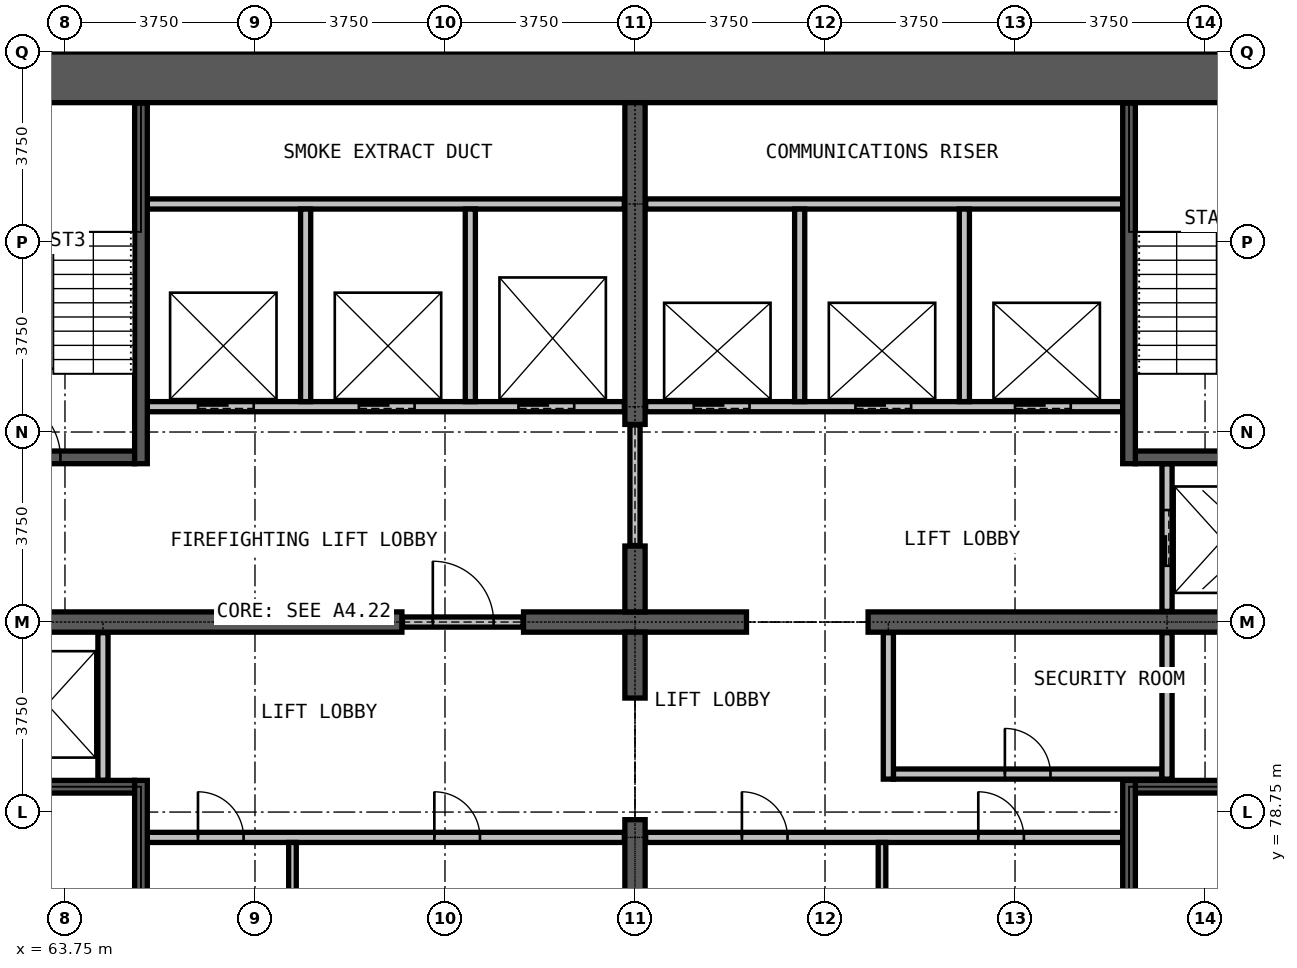
"""IFC4 building model, lengths in metres.
Left out: names, types, materials, properties, quantities, classifications, styles, units other than length and angle.
Written with IfcOpenShell. Run it as: python <this file> out.ifc"""

import sys

from ifc_helpers import new_model, si_unit, direction, frame, frame_2d, origin, place, context, subcontext, project, spatial, rectangle, extrude, element, fill, save


model = new_model("IFC4")
c1 = context("Model", 3, precision=1e-05, world=origin(), true_north=direction((0.0, 1.0)))
c2 = subcontext(c1, "Body", "Model", "MODEL_VIEW")
j1 = project(units=[si_unit("LENGTHUNIT", "METRE"), si_unit("PLANEANGLEUNIT", "RADIAN")], contexts=[c1])
p1 = place(None, origin())
s1 = spatial("IfcSite", under=j1, at=p1, CompositionType="ELEMENT")
p2 = place(p1, origin())
s2 = spatial("IfcBuilding", under=s1, at=p2, CompositionType="ELEMENT")
p3 = place(p2, frame((0.0, 0.0, 192.3)))
s3 = spatial("IfcBuildingStorey", under=s2, at=p3, CompositionType="ELEMENT", Elevation=192.3)
p4 = place(p3, frame((90.0, 93.25, 0.0), z_axis=(0.0, 0.0, 1.0), x_axis=(-1.0, 0.0, 0.0)))
e1 = element("IfcWall", 1, at=p4, inside=s3, PredefinedType="SHEAR", context=c2, shape_type="SweptSolid", body=[
    extrude(rectangle(XDim=30.0, YDim=1.0, at=frame_2d((15.0, 0.0))), origin(), (0.0, 0.0, 1.0), 3.6),
])
p5 = place(p3, frame((61.0, 82.5, 0.0), z_axis=(0.0, 0.0, 1.0), x_axis=(1.0, 0.0, 0.0)))
e2 = element("IfcWall", 2, at=p5, inside=s3, PredefinedType="SHEAR", context=c2, shape_type="SweptSolid", body=[
    extrude(rectangle(XDim=9.4, YDim=0.4, at=frame_2d((4.7, 0.0))), origin(), (0.0, 0.0, 1.0), 3.6),
])
p6 = place(p3, frame((72.8, 82.5, 0.0), z_axis=(0.0, 0.0, 1.0), x_axis=(1.0, 0.0, 0.0)))
e3 = element("IfcWall", 3, at=p6, inside=s3, PredefinedType="SHEAR", context=c2, shape_type="SweptSolid", body=[
    extrude(rectangle(XDim=4.4, YDim=0.4, at=frame_2d((2.2, 0.0))), origin(), (0.0, 0.0, 1.0), 3.6),
])
p7 = place(p3, frame((79.6, 82.5, 0.0), z_axis=(0.0, 0.0, 1.0), x_axis=(1.0, 0.0, 0.0)))
e4 = element("IfcWall", 4, at=p7, inside=s3, PredefinedType="SHEAR", context=c2, shape_type="SweptSolid", body=[
    extrude(rectangle(XDim=9.4, YDim=0.4, at=frame_2d((4.7, 0.0))), origin(), (0.0, 0.0, 1.0), 3.6),
])
p8 = place(p3, frame((75.0, 72.25, 0.0), z_axis=(0.0, 0.0, 1.0), x_axis=(0.0, 1.0, 0.0)))
e5 = element("IfcWall", 5, at=p8, inside=s3, PredefinedType="SHEAR", context=c2, shape_type="SweptSolid", body=[
    extrude(rectangle(XDim=6.35, YDim=0.4, at=frame_2d((3.175, 0.0))), origin(), (0.0, 0.0, 1.0), 3.6),
])
for number, where, z_axis, x_axis in (
    (6, (75.0, 81.0, 0.0), (0.0, 0.0, 1.0), (0.0, 1.0, 0.0)),
    (7, (75.0, 82.7, 0.0), (0.0, 0.0, 1.0), (0.0, 1.0, 0.0)),
):
    element("IfcWall", number, at=place(p3, frame(where, z_axis=z_axis, x_axis=x_axis)), inside=s3, PredefinedType="SHEAR", context=c2, shape_type="SweptSolid", body=[
        extrude(rectangle(XDim=1.3, YDim=0.4, at=frame_2d((0.65, 0.0))), origin(), (0.0, 0.0, 1.0), 3.6),
    ])
p9 = place(p3, frame((75.0, 86.4, 0.0), z_axis=(0.0, 0.0, 1.0), x_axis=(0.0, 1.0, 0.0)))
e8 = element("IfcWall", 8, at=p9, inside=s3, PredefinedType="SHEAR", context=c2, shape_type="SweptSolid", body=[
    extrude(rectangle(XDim=6.35, YDim=0.4, at=frame_2d((3.175, 0.0))), origin(), (0.0, 0.0, 1.0), 3.6),
])
p10 = place(p3, frame((65.375, 78.25, 0.0), z_axis=(0.0, 0.0, 1.0), x_axis=(1.0, 0.0, 0.0)))
e9 = element("IfcWall", 9, at=p10, inside=s3, PredefinedType="PARTITIONING", context=c2, shape_type="SweptSolid", body=[
    extrude(rectangle(XDim=9.415, YDim=0.2, at=frame_2d((4.708, 0.0))), origin(), (0.0, 0.0, 1.0), 3.3),
])
p11 = place(p10, frame((1.0, 0.0, 0.0)))
e10 = element("IfcOpeningElement", 10, at=p11, cuts=e9, PredefinedType="OPENING", context=c2, shape_type="SweptSolid", body=[
    extrude(rectangle(XDim=0.9, YDim=2.2, at=frame_2d((0.45, 1.1))), frame((0.0, 0.11, 0.0), z_axis=(0.0, -1.0, 0.0), x_axis=(1.0, 0.0, 0.0)), (0.0, 0.0, 1.0), 0.22),
])
p12 = place(p10, frame((5.665, 0.0, 0.0)))
e11 = element("IfcOpeningElement", 11, at=p12, cuts=e9, PredefinedType="OPENING", context=c2, shape_type="SweptSolid", body=[
    extrude(rectangle(XDim=0.9, YDim=2.2, at=frame_2d((0.45, 1.1))), frame((0.0, 0.11, 0.0), z_axis=(0.0, -1.0, 0.0), x_axis=(1.0, 0.0, 0.0)), (0.0, 0.0, 1.0), 0.22),
])
p13 = place(p3, frame((75.21, 78.25, 0.0), z_axis=(0.0, 0.0, 1.0), x_axis=(1.0, 0.0, 0.0)))
e12 = element("IfcWall", 12, at=p13, inside=s3, PredefinedType="PARTITIONING", context=c2, shape_type="SweptSolid", body=[
    extrude(rectangle(XDim=9.415, YDim=0.2, at=frame_2d((4.708, 0.0))), origin(), (0.0, 0.0, 1.0), 3.3),
])
p14 = place(p13, frame((1.9, 0.0, 0.0)))
e13 = element("IfcOpeningElement", 13, at=p14, cuts=e12, PredefinedType="OPENING", context=c2, shape_type="SweptSolid", body=[
    extrude(rectangle(XDim=0.9, YDim=2.2, at=frame_2d((0.45, 1.1))), frame((0.0, 0.11, 0.0), z_axis=(0.0, -1.0, 0.0), x_axis=(1.0, 0.0, 0.0)), (0.0, 0.0, 1.0), 0.22),
])
p15 = place(p13, frame((6.565, 0.0, 0.0)))
e14 = element("IfcOpeningElement", 14, at=p15, cuts=e12, PredefinedType="OPENING", context=c2, shape_type="SweptSolid", body=[
    extrude(rectangle(XDim=0.9, YDim=2.2, at=frame_2d((0.45, 1.1))), frame((0.0, 0.11, 0.0), z_axis=(0.0, -1.0, 0.0), x_axis=(1.0, 0.0, 0.0)), (0.0, 0.0, 1.0), 0.22),
])
p16 = place(p3, frame((80.1, 79.5, 0.0), z_axis=(0.0, 0.0, 1.0), x_axis=(1.0, 0.0, 0.0)))
e15 = element("IfcWall", 15, at=p16, inside=s3, PredefinedType="PARTITIONING", context=c2, shape_type="SweptSolid", body=[
    extrude(rectangle(XDim=5.3, YDim=0.2, at=frame_2d((2.65, 0.0))), origin(), (0.0, 0.0, 1.0), 3.3),
])
p17 = place(p16, frame((2.2, 0.0, 0.0)))
e16 = element("IfcOpeningElement", 16, at=p17, cuts=e15, PredefinedType="OPENING", context=c2, shape_type="SweptSolid", body=[
    extrude(rectangle(XDim=0.9, YDim=2.2, at=frame_2d((0.45, 1.1))), frame((0.0, 0.11, 0.0), z_axis=(0.0, -1.0, 0.0), x_axis=(1.0, 0.0, 0.0)), (0.0, 0.0, 1.0), 0.22),
])
p18 = place(p3, frame((70.41, 82.5, 0.0), z_axis=(0.0, 0.0, 1.0), x_axis=(1.0, 0.0, 0.0)))
e17 = element("IfcWall", 17, at=p18, inside=s3, PredefinedType="PARTITIONING", context=c2, shape_type="SweptSolid", body=[
    extrude(rectangle(XDim=2.38, YDim=0.2, at=frame_2d((1.19, 0.0))), origin(), (0.0, 0.0, 1.0), 2.4),
])
p19 = place(p18, frame((0.6, 0.0, 0.0)))
e18 = element("IfcOpeningElement", 18, at=p19, cuts=e17, PredefinedType="OPENING", context=c2, shape_type="SweptSolid", body=[
    extrude(rectangle(XDim=1.2, YDim=2.2, at=frame_2d((0.6, 1.1))), frame((0.0, 0.11, 0.0), z_axis=(0.0, -1.0, 0.0), x_axis=(1.0, 0.0, 0.0)), (0.0, 0.0, 1.0), 0.22),
])
p20 = place(p3, frame((75.0, 84.01, 0.0), z_axis=(0.0, 0.0, 1.0), x_axis=(0.0, 1.0, 0.0)))
e19 = element("IfcWall", 19, at=p20, inside=s3, PredefinedType="PARTITIONING", context=c2, shape_type="SweptSolid", body=[
    extrude(rectangle(XDim=2.38, YDim=0.2, at=frame_2d((1.19, 0.0))), origin(), (0.0, 0.0, 1.0), 2.4),
])
for number, where, z_axis, x_axis in (
    (20, (80.0, 79.4, 0.0), (0.0, 0.0, 1.0), (0.0, 1.0, 0.0)),
    (21, (85.5, 79.4, 0.0), (0.0, 0.0, 1.0), (0.0, 1.0, 0.0)),
):
    element("IfcWall", number, at=place(p3, frame(where, z_axis=z_axis, x_axis=x_axis)), inside=s3, PredefinedType="PARTITIONING", context=c2, shape_type="SweptSolid", body=[
        extrude(rectangle(XDim=2.89, YDim=0.2, at=frame_2d((1.445, 0.0))), origin(), (0.0, 0.0, 1.0), 3.3),
    ])
for number, where, z_axis, x_axis in (
    (22, (68.24, 74.35, 0.0), (0.0, 0.0, 1.0), (0.0, 1.0, 0.0)),
    (23, (79.875, 74.35, 0.0), (0.0, 0.0, 1.0), (0.0, 1.0, 0.0)),
):
    element("IfcWall", number, at=place(p3, frame(where, z_axis=z_axis, x_axis=x_axis)), inside=s3, PredefinedType="PARTITIONING", context=c2, shape_type="SweptSolid", body=[
        extrude(rectangle(XDim=3.8, YDim=0.15, at=frame_2d((1.9, 0.0))), origin(), (0.0, 0.0, 1.0), 3.3),
    ])
p21 = place(p3, frame((65.375, 86.75, 0.0), z_axis=(0.0, 0.0, 1.0), x_axis=(1.0, 0.0, 0.0)))
e24 = element("IfcWall", 24, at=p21, inside=s3, PredefinedType="PARTITIONING", context=c2, shape_type="SweptSolid", body=[
    extrude(rectangle(XDim=9.415, YDim=0.2, at=frame_2d((4.708, 0.0))), origin(), (0.0, 0.0, 1.0), 3.3),
])
p22 = place(p21, frame((1.0, 0.0, 0.0)))
e25 = element("IfcOpeningElement", 25, at=p22, cuts=e24, PredefinedType="OPENING", context=c2, shape_type="SweptSolid", body=[
    extrude(rectangle(XDim=1.1, YDim=2.2, at=frame_2d((0.55, 1.1))), frame((0.0, 0.11, 0.0), z_axis=(0.0, -1.0, 0.0), x_axis=(1.0, 0.0, 0.0)), (0.0, 0.0, 1.0), 0.22),
])
p23 = place(p21, frame((4.175, 0.0, 0.0)))
e26 = element("IfcOpeningElement", 26, at=p23, cuts=e24, PredefinedType="OPENING", context=c2, shape_type="SweptSolid", body=[
    extrude(rectangle(XDim=1.1, YDim=2.2, at=frame_2d((0.55, 1.1))), frame((0.0, 0.11, 0.0), z_axis=(0.0, -1.0, 0.0), x_axis=(1.0, 0.0, 0.0)), (0.0, 0.0, 1.0), 0.22),
])
p24 = place(p21, frame((7.325, 0.0, 0.0)))
e27 = element("IfcOpeningElement", 27, at=p24, cuts=e24, PredefinedType="OPENING", context=c2, shape_type="SweptSolid", body=[
    extrude(rectangle(XDim=1.1, YDim=2.2, at=frame_2d((0.55, 1.1))), frame((0.0, 0.11, 0.0), z_axis=(0.0, -1.0, 0.0), x_axis=(1.0, 0.0, 0.0)), (0.0, 0.0, 1.0), 0.22),
])
p25 = place(p3, frame((75.21, 86.75, 0.0), z_axis=(0.0, 0.0, 1.0), x_axis=(1.0, 0.0, 0.0)))
e28 = element("IfcWall", 28, at=p25, inside=s3, PredefinedType="PARTITIONING", context=c2, shape_type="SweptSolid", body=[
    extrude(rectangle(XDim=9.415, YDim=0.2, at=frame_2d((4.708, 0.0))), origin(), (0.0, 0.0, 1.0), 3.3),
])
p26 = place(p25, frame((0.95, 0.0, 0.0)))
e29 = element("IfcOpeningElement", 29, at=p26, cuts=e28, PredefinedType="OPENING", context=c2, shape_type="SweptSolid", body=[
    extrude(rectangle(XDim=1.1, YDim=2.2, at=frame_2d((0.55, 1.1))), frame((0.0, 0.11, 0.0), z_axis=(0.0, -1.0, 0.0), x_axis=(1.0, 0.0, 0.0)), (0.0, 0.0, 1.0), 0.22),
])
p27 = place(p25, frame((4.14, 0.0, 0.0)))
e30 = element("IfcOpeningElement", 30, at=p27, cuts=e28, PredefinedType="OPENING", context=c2, shape_type="SweptSolid", body=[
    extrude(rectangle(XDim=1.1, YDim=2.2, at=frame_2d((0.55, 1.1))), frame((0.0, 0.11, 0.0), z_axis=(0.0, -1.0, 0.0), x_axis=(1.0, 0.0, 0.0)), (0.0, 0.0, 1.0), 0.22),
])
p28 = place(p25, frame((7.29, 0.0, 0.0)))
e31 = element("IfcOpeningElement", 31, at=p28, cuts=e28, PredefinedType="OPENING", context=c2, shape_type="SweptSolid", body=[
    extrude(rectangle(XDim=1.1, YDim=2.2, at=frame_2d((0.55, 1.1))), frame((0.0, 0.11, 0.0), z_axis=(0.0, -1.0, 0.0), x_axis=(1.0, 0.0, 0.0)), (0.0, 0.0, 1.0), 0.22),
])
for number, where, z_axis, x_axis in (
    (32, (65.375, 90.75, 0.0), (0.0, 0.0, 1.0), (1.0, 0.0, 0.0)),
    (33, (75.21, 90.75, 0.0), (0.0, 0.0, 1.0), (1.0, 0.0, 0.0)),
):
    element("IfcWall", number, at=place(p3, frame(where, z_axis=z_axis, x_axis=x_axis)), inside=s3, PredefinedType="PARTITIONING", context=c2, shape_type="SweptSolid", body=[
        extrude(rectangle(XDim=9.415, YDim=0.2, at=frame_2d((4.708, 0.0))), origin(), (0.0, 0.0, 1.0), 3.3),
    ])
p29 = place(p3, frame((64.5, 79.375, 0.0), z_axis=(0.0, 0.0, 1.0), x_axis=(0.0, 1.0, 0.0)))
e34 = element("IfcWall", 34, at=p29, inside=s3, PredefinedType="PARTITIONING", context=c2, shape_type="SweptSolid", body=[
    extrude(rectangle(XDim=2.915, YDim=0.2, at=frame_2d((1.458, 0.0))), origin(), (0.0, 0.0, 1.0), 3.3),
])
for number, where, z_axis, x_axis in (
    (35, (68.5, 86.85, 0.0), (0.0, 0.0, 1.0), (0.0, 1.0, 0.0)),
    (36, (71.75, 86.85, 0.0), (0.0, 0.0, 1.0), (0.0, 1.0, 0.0)),
    (37, (78.25, 86.85, 0.0), (0.0, 0.0, 1.0), (0.0, 1.0, 0.0)),
    (38, (81.5, 86.85, 0.0), (0.0, 0.0, 1.0), (0.0, 1.0, 0.0)),
):
    element("IfcWall", number, at=place(p3, frame(where, z_axis=z_axis, x_axis=x_axis)), inside=s3, PredefinedType="PARTITIONING", context=c2, shape_type="SweptSolid", body=[
        extrude(rectangle(XDim=3.8, YDim=0.2, at=frame_2d((1.9, 0.0))), origin(), (0.0, 0.0, 1.0), 3.3),
    ])
p30 = place(p3, frame((85.5, 82.71, 0.0), z_axis=(0.0, 0.0, 1.0), x_axis=(0.0, 1.0, 0.0)))
e39 = element("IfcWall", 39, at=p30, inside=s3, PredefinedType="PARTITIONING", context=c2, shape_type="SweptSolid", body=[
    extrude(rectangle(XDim=2.915, YDim=0.2, at=frame_2d((1.458, 0.0))), origin(), (0.0, 0.0, 1.0), 3.3),
])
p31 = place(p30, frame((0.9, 0.0, 0.0)))
e40 = element("IfcOpeningElement", 40, at=p31, cuts=e39, PredefinedType="OPENING", context=c2, shape_type="SweptSolid", body=[
    extrude(rectangle(XDim=1.1, YDim=2.2, at=frame_2d((0.55, 1.1))), frame((0.0, 0.11, 0.0), z_axis=(0.0, -1.0, 0.0), x_axis=(1.0, 0.0, 0.0)), (0.0, 0.0, 1.0), 0.22),
])
for number, where, z_axis, x_axis in (
    (41, (61.01, 79.25, 0.0), (0.0, 0.0, 1.0), (1.0, 0.0, 0.0)),
    (42, (84.875, 79.25, 0.0), (0.0, 0.0, 1.0), (1.0, 0.0, 0.0)),
):
    element("IfcWall", number, at=place(p3, frame(where, z_axis=z_axis, x_axis=x_axis)), inside=s3, PredefinedType="PARTITIONING", context=c2, shape_type="SweptSolid", body=[
        extrude(rectangle(XDim=4.115, YDim=0.25, at=frame_2d((2.058, 0.0))), origin(), (0.0, 0.0, 1.0), 3.3),
    ])
p32 = place(p3, frame((61.01, 85.75, 0.0), z_axis=(0.0, 0.0, 1.0), x_axis=(1.0, 0.0, 0.0)))
e43 = element("IfcWall", 43, at=p32, inside=s3, PredefinedType="PARTITIONING", context=c2, shape_type="SweptSolid", body=[
    extrude(rectangle(XDim=4.115, YDim=0.25, at=frame_2d((2.058, 0.0))), origin(), (0.0, 0.0, 1.0), 3.3),
])
p33 = place(p32, frame((1.45, 0.0, 0.0)))
e44 = element("IfcOpeningElement", 44, at=p33, cuts=e43, PredefinedType="OPENING", context=c2, shape_type="SweptSolid", body=[
    extrude(rectangle(XDim=1.2, YDim=2.2, at=frame_2d((0.6, 1.1))), frame((0.0, 0.135, 0.0), z_axis=(0.0, -1.0, 0.0), x_axis=(1.0, 0.0, 0.0)), (0.0, 0.0, 1.0), 0.27),
])
p34 = place(p3, frame((84.875, 85.75, 0.0), z_axis=(0.0, 0.0, 1.0), x_axis=(1.0, 0.0, 0.0)))
e45 = element("IfcWall", 45, at=p34, inside=s3, PredefinedType="PARTITIONING", context=c2, shape_type="SweptSolid", body=[
    extrude(rectangle(XDim=4.115, YDim=0.25, at=frame_2d((2.058, 0.0))), origin(), (0.0, 0.0, 1.0), 3.3),
])
for number, where, z_axis, x_axis in (
    (46, (65.25, 72.26, 0.0), (0.0, 0.0, 1.0), (0.0, 1.0, 0.0)),
    (47, (65.25, 85.625, 0.0), (0.0, 0.0, 1.0), (0.0, 1.0, 0.0)),
    (48, (84.75, 72.26, 0.0), (0.0, 0.0, 1.0), (0.0, 1.0, 0.0)),
    (49, (84.75, 85.625, 0.0), (0.0, 0.0, 1.0), (0.0, 1.0, 0.0)),
):
    element("IfcWall", number, at=place(p3, frame(where, z_axis=z_axis, x_axis=x_axis)), inside=s3, PredefinedType="PARTITIONING", context=c2, shape_type="SweptSolid", body=[
        extrude(rectangle(XDim=7.115, YDim=0.25, at=frame_2d((3.558, 0.0))), origin(), (0.0, 0.0, 1.0), 3.3),
    ])
p35 = place(p26, origin())
e50 = element("IfcDoor", 50, at=p35, inside=s3, OperationType="DOUBLE_DOOR_SLIDING", PredefinedType="DOOR", context=c2, shape_type="SweptSolid", body=[
    extrude(rectangle(XDim=1.1, YDim=2.2, at=frame_2d((0.55, 1.1))), frame((0.0, 0.025, 0.0), z_axis=(0.0, -1.0, 0.0), x_axis=(1.0, 0.0, 0.0)), (0.0, 0.0, 1.0), 0.05),
])
fill(e29, e50)
p36 = place(p27, origin())
e51 = element("IfcDoor", 51, at=p36, inside=s3, OperationType="DOUBLE_DOOR_SLIDING", PredefinedType="DOOR", context=c2, shape_type="SweptSolid", body=[
    extrude(rectangle(XDim=1.1, YDim=2.2, at=frame_2d((0.55, 1.1))), frame((0.0, 0.025, 0.0), z_axis=(0.0, -1.0, 0.0), x_axis=(1.0, 0.0, 0.0)), (0.0, 0.0, 1.0), 0.05),
])
fill(e30, e51)
p37 = place(p28, origin())
e52 = element("IfcDoor", 52, at=p37, inside=s3, OperationType="DOUBLE_DOOR_SLIDING", PredefinedType="DOOR", context=c2, shape_type="SweptSolid", body=[
    extrude(rectangle(XDim=1.1, YDim=2.2, at=frame_2d((0.55, 1.1))), frame((0.0, 0.025, 0.0), z_axis=(0.0, -1.0, 0.0), x_axis=(1.0, 0.0, 0.0)), (0.0, 0.0, 1.0), 0.05),
])
fill(e31, e52)
p38 = place(p22, origin())
e53 = element("IfcDoor", 53, at=p38, inside=s3, OperationType="DOUBLE_DOOR_SLIDING", PredefinedType="DOOR", context=c2, shape_type="SweptSolid", body=[
    extrude(rectangle(XDim=1.1, YDim=2.2, at=frame_2d((0.55, 1.1))), frame((0.0, 0.025, 0.0), z_axis=(0.0, -1.0, 0.0), x_axis=(1.0, 0.0, 0.0)), (0.0, 0.0, 1.0), 0.05),
])
fill(e25, e53)
p39 = place(p23, origin())
e54 = element("IfcDoor", 54, at=p39, inside=s3, OperationType="DOUBLE_DOOR_SLIDING", PredefinedType="DOOR", context=c2, shape_type="SweptSolid", body=[
    extrude(rectangle(XDim=1.1, YDim=2.2, at=frame_2d((0.55, 1.1))), frame((0.0, 0.025, 0.0), z_axis=(0.0, -1.0, 0.0), x_axis=(1.0, 0.0, 0.0)), (0.0, 0.0, 1.0), 0.05),
])
fill(e26, e54)
p40 = place(p24, origin())
e55 = element("IfcDoor", 55, at=p40, inside=s3, OperationType="DOUBLE_DOOR_SLIDING", PredefinedType="DOOR", context=c2, shape_type="SweptSolid", body=[
    extrude(rectangle(XDim=1.1, YDim=2.2, at=frame_2d((0.55, 1.1))), frame((0.0, 0.025, 0.0), z_axis=(0.0, -1.0, 0.0), x_axis=(1.0, 0.0, 0.0)), (0.0, 0.0, 1.0), 0.05),
])
fill(e27, e55)
p41 = place(p31, origin())
e56 = element("IfcDoor", 56, at=p41, inside=s3, OperationType="DOUBLE_DOOR_SLIDING", PredefinedType="DOOR", context=c2, shape_type="SweptSolid", body=[
    extrude(rectangle(XDim=1.1, YDim=2.2, at=frame_2d((0.55, 1.1))), frame((0.0, 0.025, 0.0), z_axis=(0.0, -1.0, 0.0), x_axis=(1.0, 0.0, 0.0)), (0.0, 0.0, 1.0), 0.05),
])
fill(e40, e56)
p42 = place(p19, origin())
e57 = element("IfcDoor", 57, at=p42, inside=s3, OperationType="SINGLE_SWING_LEFT", PredefinedType="DOOR", context=c2, shape_type="SweptSolid", body=[
    extrude(rectangle(XDim=1.2, YDim=2.2, at=frame_2d((0.6, 1.1))), frame((0.0, 0.025, 0.0), z_axis=(0.0, -1.0, 0.0), x_axis=(1.0, 0.0, 0.0)), (0.0, 0.0, 1.0), 0.05),
])
fill(e18, e57)
p43 = place(p33, origin())
e58 = element("IfcDoor", 58, at=p43, inside=s3, OperationType="SINGLE_SWING_LEFT", PredefinedType="DOOR", context=c2, shape_type="SweptSolid", body=[
    extrude(rectangle(XDim=1.2, YDim=2.2, at=frame_2d((0.6, 1.1))), frame((0.0, 0.025, 0.0), z_axis=(0.0, -1.0, 0.0), x_axis=(1.0, 0.0, 0.0)), (0.0, 0.0, 1.0), 0.05),
])
fill(e44, e58)
p44 = place(p17, origin())
e59 = element("IfcDoor", 59, at=p44, inside=s3, OperationType="SINGLE_SWING_LEFT", PredefinedType="DOOR", context=c2, shape_type="SweptSolid", body=[
    extrude(rectangle(XDim=0.9, YDim=2.2, at=frame_2d((0.45, 1.1))), frame((0.0, 0.025, 0.0), z_axis=(0.0, -1.0, 0.0), x_axis=(1.0, 0.0, 0.0)), (0.0, 0.0, 1.0), 0.05),
])
fill(e16, e59)
p45 = place(p11, origin())
e60 = element("IfcDoor", 60, at=p45, inside=s3, OperationType="SINGLE_SWING_LEFT", PredefinedType="DOOR", context=c2, shape_type="SweptSolid", body=[
    extrude(rectangle(XDim=0.9, YDim=2.2, at=frame_2d((0.45, 1.1))), frame((0.0, 0.025, 0.0), z_axis=(0.0, -1.0, 0.0), x_axis=(1.0, 0.0, 0.0)), (0.0, 0.0, 1.0), 0.05),
])
fill(e10, e60)
p46 = place(p12, origin())
e61 = element("IfcDoor", 61, at=p46, inside=s3, OperationType="SINGLE_SWING_RIGHT", PredefinedType="DOOR", context=c2, shape_type="SweptSolid", body=[
    extrude(rectangle(XDim=0.9, YDim=2.2, at=frame_2d((0.45, 1.1))), frame((0.0, 0.025, 0.0), z_axis=(0.0, -1.0, 0.0), x_axis=(1.0, 0.0, 0.0)), (0.0, 0.0, 1.0), 0.05),
])
fill(e11, e61)
p47 = place(p14, origin())
e62 = element("IfcDoor", 62, at=p47, inside=s3, OperationType="SINGLE_SWING_RIGHT", PredefinedType="DOOR", context=c2, shape_type="SweptSolid", body=[
    extrude(rectangle(XDim=0.9, YDim=2.2, at=frame_2d((0.45, 1.1))), frame((0.0, 0.025, 0.0), z_axis=(0.0, -1.0, 0.0), x_axis=(1.0, 0.0, 0.0)), (0.0, 0.0, 1.0), 0.05),
])
fill(e13, e62)
p48 = place(p15, origin())
e63 = element("IfcDoor", 63, at=p48, inside=s3, OperationType="SINGLE_SWING_LEFT", PredefinedType="DOOR", context=c2, shape_type="SweptSolid", body=[
    extrude(rectangle(XDim=0.9, YDim=2.2, at=frame_2d((0.45, 1.1))), frame((0.0, 0.025, 0.0), z_axis=(0.0, -1.0, 0.0), x_axis=(1.0, 0.0, 0.0)), (0.0, 0.0, 1.0), 0.05),
])
fill(e14, e63)
save(model, sys.argv[1])
